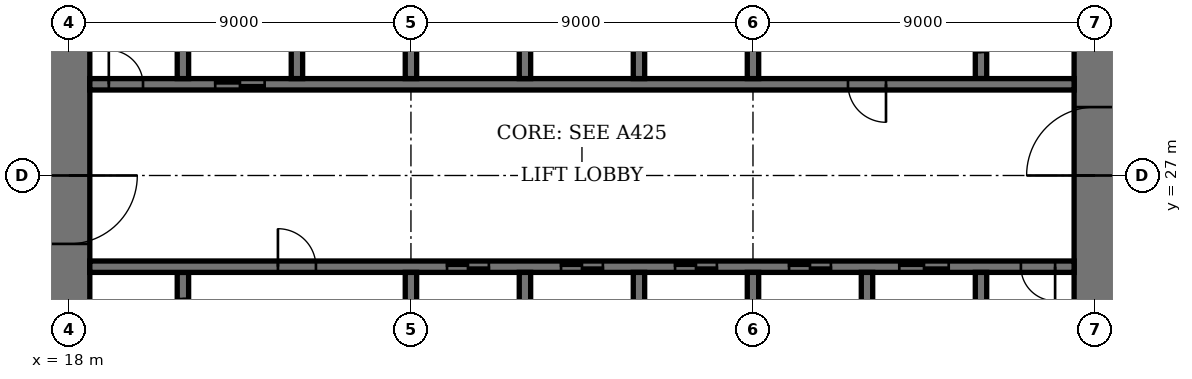
"""IFC4 building model, lengths in metres.
Left out: names, types, materials, properties, quantities, classifications, styles, units other than length and angle.
Written with IfcOpenShell. Run it as: python <this file> out.ifc"""

import sys

from ifc_helpers import new_model, si_unit, direction, frame, frame_2d, origin, place, context, subcontext, project, spatial, rectangle, extrude, element, fill, save


model = new_model("IFC4")
c1 = context("Model", 3, precision=1e-05, world=origin(), true_north=direction((0.0, 1.0)))
c2 = subcontext(c1, "Body", "Model", "MODEL_VIEW")
j1 = project(units=[si_unit("LENGTHUNIT", "METRE"), si_unit("PLANEANGLEUNIT", "RADIAN")], contexts=[c1])
p1 = place(None, origin())
s1 = spatial("IfcSite", under=j1, at=p1, CompositionType="ELEMENT")
p2 = place(p1, origin())
s2 = spatial("IfcBuilding", under=s1, at=p2, CompositionType="ELEMENT")
p3 = place(p2, frame((0.0, 0.0, 59.8)))
s3 = spatial("IfcBuildingStorey", under=s2, at=p3, CompositionType="ELEMENT", Elevation=59.8)
p4 = place(p3, frame((18.0, 35.45, 0.0), z_axis=(0.0, 0.0, 1.0), x_axis=(0.0, -1.0, 0.0)))
e1 = element("IfcWall", 1, at=p4, inside=s3, PredefinedType="SHEAR", context=c2, shape_type="SweptSolid", body=[
    extrude(rectangle(XDim=16.9, YDim=1.1, at=frame_2d((8.45, 0.0))), origin(), (0.0, 0.0, 1.0), 4.0),
])
p5 = place(p4, frame((8.45, 0.0, 0.0)))
e2 = element("IfcOpeningElement", 2, at=p5, cuts=e1, PredefinedType="OPENING", context=c2, shape_type="SweptSolid", body=[
    extrude(rectangle(XDim=1.8, YDim=2.4, at=frame_2d((0.9, 1.2))), frame((0.0, 0.56, 0.0), z_axis=(0.0, -1.0, 0.0), x_axis=(1.0, 0.0, 0.0)), (0.0, 0.0, 1.0), 1.12),
])
p6 = place(p3, frame((45.0, 18.55, 0.0), z_axis=(0.0, 0.0, 1.0), x_axis=(0.0, 1.0, 0.0)))
e3 = element("IfcWall", 3, at=p6, inside=s3, PredefinedType="SHEAR", context=c2, shape_type="SweptSolid", body=[
    extrude(rectangle(XDim=16.9, YDim=1.1, at=frame_2d((8.45, 0.0))), origin(), (0.0, 0.0, 1.0), 4.0),
])
p7 = place(p6, frame((8.45, 0.0, 0.0)))
e4 = element("IfcOpeningElement", 4, at=p7, cuts=e3, PredefinedType="OPENING", context=c2, shape_type="SweptSolid", body=[
    extrude(rectangle(XDim=1.8, YDim=2.4, at=frame_2d((0.9, 1.2))), frame((0.0, 0.56, 0.0), z_axis=(0.0, -1.0, 0.0), x_axis=(1.0, 0.0, 0.0)), (0.0, 0.0, 1.0), 1.12),
])
p8 = place(p3, frame((21.0, 21.95, 0.0), z_axis=(0.0, 0.0, 1.0), x_axis=(0.0, 1.0, 0.0)))
e5 = element("IfcWall", 5, at=p8, inside=s3, PredefinedType="SHEAR", context=c2, shape_type="SweptSolid", body=[
    extrude(rectangle(XDim=2.5, YDim=0.3, at=frame_2d((1.25, 0.0))), origin(), (0.0, 0.0, 1.0), 4.0),
])
p9 = place(p8, frame((0.7, 0.0, 0.0)))
e6 = element("IfcOpeningElement", 6, at=p9, cuts=e5, PredefinedType="OPENING", context=c2, shape_type="SweptSolid", body=[
    extrude(rectangle(XDim=1.1, YDim=2.4, at=frame_2d((0.55, 1.2))), frame((0.0, 0.16, 0.0), z_axis=(0.0, -1.0, 0.0), x_axis=(1.0, 0.0, 0.0)), (0.0, 0.0, 1.0), 0.32),
])
p10 = place(p3, frame((42.0, 29.55, 0.0), z_axis=(0.0, 0.0, 1.0), x_axis=(0.0, 1.0, 0.0)))
e7 = element("IfcWall", 7, at=p10, inside=s3, PredefinedType="SHEAR", context=c2, shape_type="SweptSolid", body=[
    extrude(rectangle(XDim=2.5, YDim=0.3, at=frame_2d((1.25, 0.0))), origin(), (0.0, 0.0, 1.0), 4.0),
])
p11 = place(p10, frame((0.7, 0.0, 0.0)))
e8 = element("IfcOpeningElement", 8, at=p11, cuts=e7, PredefinedType="OPENING", context=c2, shape_type="SweptSolid", body=[
    extrude(rectangle(XDim=1.1, YDim=2.4, at=frame_2d((0.55, 1.2))), frame((0.0, 0.16, 0.0), z_axis=(0.0, -1.0, 0.0), x_axis=(1.0, 0.0, 0.0)), (0.0, 0.0, 1.0), 0.32),
])
p12 = place(p3, frame((18.55, 24.6, 0.0), z_axis=(0.0, 0.0, 1.0), x_axis=(1.0, 0.0, 0.0)))
e9 = element("IfcWall", 9, at=p12, inside=s3, PredefinedType="SHEAR", context=c2, shape_type="SweptSolid", body=[
    extrude(rectangle(XDim=25.9, YDim=0.3, at=frame_2d((12.95, 0.0))), origin(), (0.0, 0.0, 1.0), 4.0),
])
p13 = place(p12, frame((4.95, 0.0, 0.0)))
e10 = element("IfcOpeningElement", 10, at=p13, cuts=e9, PredefinedType="OPENING", context=c2, shape_type="SweptSolid", body=[
    extrude(rectangle(XDim=1.0, YDim=2.4, at=frame_2d((0.5, 1.2))), frame((0.0, 0.16, 0.0), z_axis=(0.0, -1.0, 0.0), x_axis=(1.0, 0.0, 0.0)), (0.0, 0.0, 1.0), 0.32),
])
p14 = place(p12, frame((24.5, 0.0, 0.0)))
e11 = element("IfcOpeningElement", 11, at=p14, cuts=e9, PredefinedType="OPENING", context=c2, shape_type="SweptSolid", body=[
    extrude(rectangle(XDim=0.9, YDim=2.1, at=frame_2d((0.45, 1.05))), frame((0.0, 0.16, 0.0), z_axis=(0.0, -1.0, 0.0), x_axis=(1.0, 0.0, 0.0)), (0.0, 0.0, 1.0), 0.32),
])
p15 = place(p12, frame((9.4, 0.0, 0.0)))
e12 = element("IfcOpeningElement", 12, at=p15, cuts=e9, PredefinedType="OPENING", context=c2, shape_type="SweptSolid", body=[
    extrude(rectangle(XDim=1.1, YDim=2.4, at=frame_2d((0.55, 1.2))), frame((0.0, 0.16, 0.0), z_axis=(0.0, -1.0, 0.0), x_axis=(1.0, 0.0, 0.0)), (0.0, 0.0, 1.0), 0.32),
])
p16 = place(p12, frame((12.4, 0.0, 0.0)))
e13 = element("IfcOpeningElement", 13, at=p16, cuts=e9, PredefinedType="OPENING", context=c2, shape_type="SweptSolid", body=[
    extrude(rectangle(XDim=1.1, YDim=2.4, at=frame_2d((0.55, 1.2))), frame((0.0, 0.16, 0.0), z_axis=(0.0, -1.0, 0.0), x_axis=(1.0, 0.0, 0.0)), (0.0, 0.0, 1.0), 0.32),
])
p17 = place(p12, frame((15.4, 0.0, 0.0)))
e14 = element("IfcOpeningElement", 14, at=p17, cuts=e9, PredefinedType="OPENING", context=c2, shape_type="SweptSolid", body=[
    extrude(rectangle(XDim=1.1, YDim=2.4, at=frame_2d((0.55, 1.2))), frame((0.0, 0.16, 0.0), z_axis=(0.0, -1.0, 0.0), x_axis=(1.0, 0.0, 0.0)), (0.0, 0.0, 1.0), 0.32),
])
p18 = place(p12, frame((18.4, 0.0, 0.0)))
e15 = element("IfcOpeningElement", 15, at=p18, cuts=e9, PredefinedType="OPENING", context=c2, shape_type="SweptSolid", body=[
    extrude(rectangle(XDim=1.1, YDim=2.4, at=frame_2d((0.55, 1.2))), frame((0.0, 0.16, 0.0), z_axis=(0.0, -1.0, 0.0), x_axis=(1.0, 0.0, 0.0)), (0.0, 0.0, 1.0), 0.32),
])
p19 = place(p12, frame((21.3, 0.0, 0.0)))
e16 = element("IfcOpeningElement", 16, at=p19, cuts=e9, PredefinedType="OPENING", context=c2, shape_type="SweptSolid", body=[
    extrude(rectangle(XDim=1.3, YDim=2.4, at=frame_2d((0.65, 1.2))), frame((0.0, 0.16, 0.0), z_axis=(0.0, -1.0, 0.0), x_axis=(1.0, 0.0, 0.0)), (0.0, 0.0, 1.0), 0.32),
])
p20 = place(p3, frame((18.55, 29.4, 0.0), z_axis=(0.0, 0.0, 1.0), x_axis=(1.0, 0.0, 0.0)))
e17 = element("IfcWall", 17, at=p20, inside=s3, PredefinedType="SHEAR", context=c2, shape_type="SweptSolid", body=[
    extrude(rectangle(XDim=25.9, YDim=0.3, at=frame_2d((12.95, 0.0))), origin(), (0.0, 0.0, 1.0), 4.0),
])
p21 = place(p20, frame((19.95, 0.0, 0.0)))
e18 = element("IfcOpeningElement", 18, at=p21, cuts=e17, PredefinedType="OPENING", context=c2, shape_type="SweptSolid", body=[
    extrude(rectangle(XDim=1.0, YDim=2.4, at=frame_2d((0.5, 1.2))), frame((0.0, 0.16, 0.0), z_axis=(0.0, -1.0, 0.0), x_axis=(1.0, 0.0, 0.0)), (0.0, 0.0, 1.0), 0.32),
])
p22 = place(p20, frame((0.5, 0.0, 0.0)))
e19 = element("IfcOpeningElement", 19, at=p22, cuts=e17, PredefinedType="OPENING", context=c2, shape_type="SweptSolid", body=[
    extrude(rectangle(XDim=0.9, YDim=2.1, at=frame_2d((0.45, 1.05))), frame((0.0, 0.16, 0.0), z_axis=(0.0, -1.0, 0.0), x_axis=(1.0, 0.0, 0.0)), (0.0, 0.0, 1.0), 0.32),
])
p23 = place(p20, frame((3.3, 0.0, 0.0)))
e20 = element("IfcOpeningElement", 20, at=p23, cuts=e17, PredefinedType="OPENING", context=c2, shape_type="SweptSolid", body=[
    extrude(rectangle(XDim=1.3, YDim=2.4, at=frame_2d((0.65, 1.2))), frame((0.0, 0.16, 0.0), z_axis=(0.0, -1.0, 0.0), x_axis=(1.0, 0.0, 0.0)), (0.0, 0.0, 1.0), 0.32),
])
for number, where, z_axis, x_axis in (
    (21, (30.0, 21.75, 0.0), (0.0, 0.0, 1.0), (0.0, 1.0, 0.0)),
    (22, (33.0, 29.55, 0.0), (0.0, 0.0, 1.0), (0.0, 1.0, 0.0)),
    (23, (33.0, 21.75, 0.0), (0.0, 0.0, 1.0), (0.0, 1.0, 0.0)),
    (24, (30.0, 29.55, 0.0), (0.0, 0.0, 1.0), (0.0, 1.0, 0.0)),
    (25, (36.0, 21.75, 0.0), (0.0, 0.0, 1.0), (0.0, 1.0, 0.0)),
    (26, (27.0, 29.55, 0.0), (0.0, 0.0, 1.0), (0.0, 1.0, 0.0)),
):
    element("IfcWall", number, at=place(p3, frame(where, z_axis=z_axis, x_axis=x_axis)), inside=s3, PredefinedType="SHEAR", context=c2, shape_type="SweptSolid", body=[
        extrude(rectangle(XDim=2.7, YDim=0.3, at=frame_2d((1.35, 0.0))), origin(), (0.0, 0.0, 1.0), 4.0),
    ])
for number, where, z_axis, x_axis in (
    (27, (39.0, 18.55, 0.0), (0.0, 0.0, 1.0), (0.0, 1.0, 0.0)),
    (28, (24.0, 29.55, 0.0), (0.0, 0.0, 1.0), (0.0, 1.0, 0.0)),
):
    element("IfcWall", number, at=place(p3, frame(where, z_axis=z_axis, x_axis=x_axis)), inside=s3, PredefinedType="SHEAR", context=c2, shape_type="SweptSolid", body=[
        extrude(rectangle(XDim=5.9, YDim=0.3, at=frame_2d((2.95, 0.0))), origin(), (0.0, 0.0, 1.0), 4.0),
    ])
for number, where, z_axis, x_axis in (
    (29, (42.0, 21.75, 0.0), (0.0, 0.0, 1.0), (0.0, 1.0, 0.0)),
    (30, (21.0, 29.55, 0.0), (0.0, 0.0, 1.0), (0.0, 1.0, 0.0)),
):
    element("IfcWall", number, at=place(p3, frame(where, z_axis=z_axis, x_axis=x_axis)), inside=s3, PredefinedType="SHEAR", context=c2, shape_type="SweptSolid", body=[
        extrude(rectangle(XDim=2.7, YDim=0.3, at=frame_2d((1.35, 0.0))), origin(), (0.0, 0.0, 1.0), 4.0),
    ])
for number, where, z_axis, x_axis in (
    (31, (27.0, 21.6, 0.0), (0.0, 0.0, 1.0), (0.0, 1.0, 0.0)),
    (32, (36.0, 29.55, 0.0), (0.0, 0.0, 1.0), (0.0, 1.0, 0.0)),
):
    element("IfcWall", number, at=place(p3, frame(where, z_axis=z_axis, x_axis=x_axis)), inside=s3, PredefinedType="SHEAR", context=c2, shape_type="SweptSolid", body=[
        extrude(rectangle(XDim=2.85, YDim=0.3, at=frame_2d((1.425, 0.0))), origin(), (0.0, 0.0, 1.0), 4.0),
    ])
p24 = place(p5, origin())
e33 = element("IfcDoor", 33, at=p24, inside=s3, OperationType="DOUBLE_DOOR_DOUBLE_SWING", PredefinedType="DOOR", context=c2, shape_type="SweptSolid", body=[
    extrude(rectangle(XDim=1.8, YDim=2.4, at=frame_2d((0.9, 1.2))), frame((0.0, 0.03, 0.0), z_axis=(0.0, -1.0, 0.0), x_axis=(1.0, 0.0, 0.0)), (0.0, 0.0, 1.0), 0.06),
    extrude(rectangle(XDim=0.04, YDim=2.4, at=frame_2d((0.02, 1.2))), frame((0.0, 0.55, 0.0), z_axis=(0.0, -1.0, 0.0), x_axis=(1.0, 0.0, 0.0)), (0.0, 0.0, 1.0), 1.1),
    extrude(rectangle(XDim=0.04, YDim=2.4, at=frame_2d((1.78, 1.2))), frame((0.0, 0.55, 0.0), z_axis=(0.0, -1.0, 0.0), x_axis=(1.0, 0.0, 0.0)), (0.0, 0.0, 1.0), 1.1),
    extrude(rectangle(XDim=1.8, YDim=0.04, at=frame_2d((0.9, 2.38))), frame((0.0, 0.55, 0.0), z_axis=(0.0, -1.0, 0.0), x_axis=(1.0, 0.0, 0.0)), (0.0, 0.0, 1.0), 1.1),
])
fill(e2, e33)
p25 = place(p7, origin())
e34 = element("IfcDoor", 34, at=p25, inside=s3, OperationType="DOUBLE_DOOR_DOUBLE_SWING", PredefinedType="DOOR", context=c2, shape_type="SweptSolid", body=[
    extrude(rectangle(XDim=1.8, YDim=2.4, at=frame_2d((0.9, 1.2))), frame((0.0, 0.03, 0.0), z_axis=(0.0, -1.0, 0.0), x_axis=(1.0, 0.0, 0.0)), (0.0, 0.0, 1.0), 0.06),
    extrude(rectangle(XDim=0.04, YDim=2.4, at=frame_2d((0.02, 1.2))), frame((0.0, 0.55, 0.0), z_axis=(0.0, -1.0, 0.0), x_axis=(1.0, 0.0, 0.0)), (0.0, 0.0, 1.0), 1.1),
    extrude(rectangle(XDim=0.04, YDim=2.4, at=frame_2d((1.78, 1.2))), frame((0.0, 0.55, 0.0), z_axis=(0.0, -1.0, 0.0), x_axis=(1.0, 0.0, 0.0)), (0.0, 0.0, 1.0), 1.1),
    extrude(rectangle(XDim=1.8, YDim=0.04, at=frame_2d((0.9, 2.38))), frame((0.0, 0.55, 0.0), z_axis=(0.0, -1.0, 0.0), x_axis=(1.0, 0.0, 0.0)), (0.0, 0.0, 1.0), 1.1),
])
fill(e4, e34)
p26 = place(p13, origin())
e35 = element("IfcDoor", 35, at=p26, inside=s3, OperationType="SINGLE_SWING_RIGHT", PredefinedType="DOOR", context=c2, shape_type="SweptSolid", body=[
    extrude(rectangle(XDim=1.0, YDim=2.4, at=frame_2d((0.5, 1.2))), frame((0.0, 0.03, 0.0), z_axis=(0.0, -1.0, 0.0), x_axis=(1.0, 0.0, 0.0)), (0.0, 0.0, 1.0), 0.06),
])
fill(e10, e35)
p27 = place(p21, origin())
e36 = element("IfcDoor", 36, at=p27, inside=s3, OperationType="SINGLE_SWING_RIGHT", PredefinedType="DOOR", context=c2, shape_type="SweptSolid", body=[
    extrude(rectangle(XDim=1.0, YDim=2.4, at=frame_2d((0.5, 1.2))), frame((0.0, 0.03, 0.0), z_axis=(0.0, -1.0, 0.0), x_axis=(1.0, 0.0, 0.0)), (0.0, 0.0, 1.0), 0.06),
])
fill(e18, e36)
p28 = place(p14, origin())
e37 = element("IfcDoor", 37, at=p28, inside=s3, OperationType="SINGLE_SWING_RIGHT", PredefinedType="DOOR", context=c2, shape_type="SweptSolid", body=[
    extrude(rectangle(XDim=0.9, YDim=2.1, at=frame_2d((0.45, 1.05))), frame((0.0, 0.03, 0.0), z_axis=(0.0, -1.0, 0.0), x_axis=(1.0, 0.0, 0.0)), (0.0, 0.0, 1.0), 0.06),
])
fill(e11, e37)
p29 = place(p22, origin())
e38 = element("IfcDoor", 38, at=p29, inside=s3, OperationType="SINGLE_SWING_RIGHT", PredefinedType="DOOR", context=c2, shape_type="SweptSolid", body=[
    extrude(rectangle(XDim=0.9, YDim=2.1, at=frame_2d((0.45, 1.05))), frame((0.0, 0.03, 0.0), z_axis=(0.0, -1.0, 0.0), x_axis=(1.0, 0.0, 0.0)), (0.0, 0.0, 1.0), 0.06),
])
fill(e19, e38)
p30 = place(p15, origin())
e39 = element("IfcDoor", 39, at=p30, inside=s3, OperationType="DOUBLE_DOOR_SLIDING", PredefinedType="DOOR", context=c2, shape_type="SweptSolid", body=[
    extrude(rectangle(XDim=1.1, YDim=2.4, at=frame_2d((0.55, 1.2))), frame((0.0, 0.02, 0.0), z_axis=(0.0, -1.0, 0.0), x_axis=(1.0, 0.0, 0.0)), (0.0, 0.0, 1.0), 0.04),
])
fill(e12, e39)
p31 = place(p16, origin())
e40 = element("IfcDoor", 40, at=p31, inside=s3, OperationType="DOUBLE_DOOR_SLIDING", PredefinedType="DOOR", context=c2, shape_type="SweptSolid", body=[
    extrude(rectangle(XDim=1.1, YDim=2.4, at=frame_2d((0.55, 1.2))), frame((0.0, 0.02, 0.0), z_axis=(0.0, -1.0, 0.0), x_axis=(1.0, 0.0, 0.0)), (0.0, 0.0, 1.0), 0.04),
])
fill(e13, e40)
p32 = place(p17, origin())
e41 = element("IfcDoor", 41, at=p32, inside=s3, OperationType="DOUBLE_DOOR_SLIDING", PredefinedType="DOOR", context=c2, shape_type="SweptSolid", body=[
    extrude(rectangle(XDim=1.1, YDim=2.4, at=frame_2d((0.55, 1.2))), frame((0.0, 0.02, 0.0), z_axis=(0.0, -1.0, 0.0), x_axis=(1.0, 0.0, 0.0)), (0.0, 0.0, 1.0), 0.04),
])
fill(e14, e41)
p33 = place(p18, origin())
e42 = element("IfcDoor", 42, at=p33, inside=s3, OperationType="DOUBLE_DOOR_SLIDING", PredefinedType="DOOR", context=c2, shape_type="SweptSolid", body=[
    extrude(rectangle(XDim=1.1, YDim=2.4, at=frame_2d((0.55, 1.2))), frame((0.0, 0.02, 0.0), z_axis=(0.0, -1.0, 0.0), x_axis=(1.0, 0.0, 0.0)), (0.0, 0.0, 1.0), 0.04),
])
fill(e15, e42)
p34 = place(p19, origin())
e43 = element("IfcDoor", 43, at=p34, inside=s3, OperationType="DOUBLE_DOOR_SLIDING", PredefinedType="DOOR", context=c2, shape_type="SweptSolid", body=[
    extrude(rectangle(XDim=1.3, YDim=2.4, at=frame_2d((0.65, 1.2))), frame((0.0, 0.02, 0.0), z_axis=(0.0, -1.0, 0.0), x_axis=(1.0, 0.0, 0.0)), (0.0, 0.0, 1.0), 0.04),
])
fill(e16, e43)
p35 = place(p23, origin())
e44 = element("IfcDoor", 44, at=p35, inside=s3, OperationType="DOUBLE_DOOR_SLIDING", PredefinedType="DOOR", context=c2, shape_type="SweptSolid", body=[
    extrude(rectangle(XDim=1.3, YDim=2.4, at=frame_2d((0.65, 1.2))), frame((0.0, 0.02, 0.0), z_axis=(0.0, -1.0, 0.0), x_axis=(1.0, 0.0, 0.0)), (0.0, 0.0, 1.0), 0.04),
])
fill(e20, e44)
save(model, sys.argv[1])
